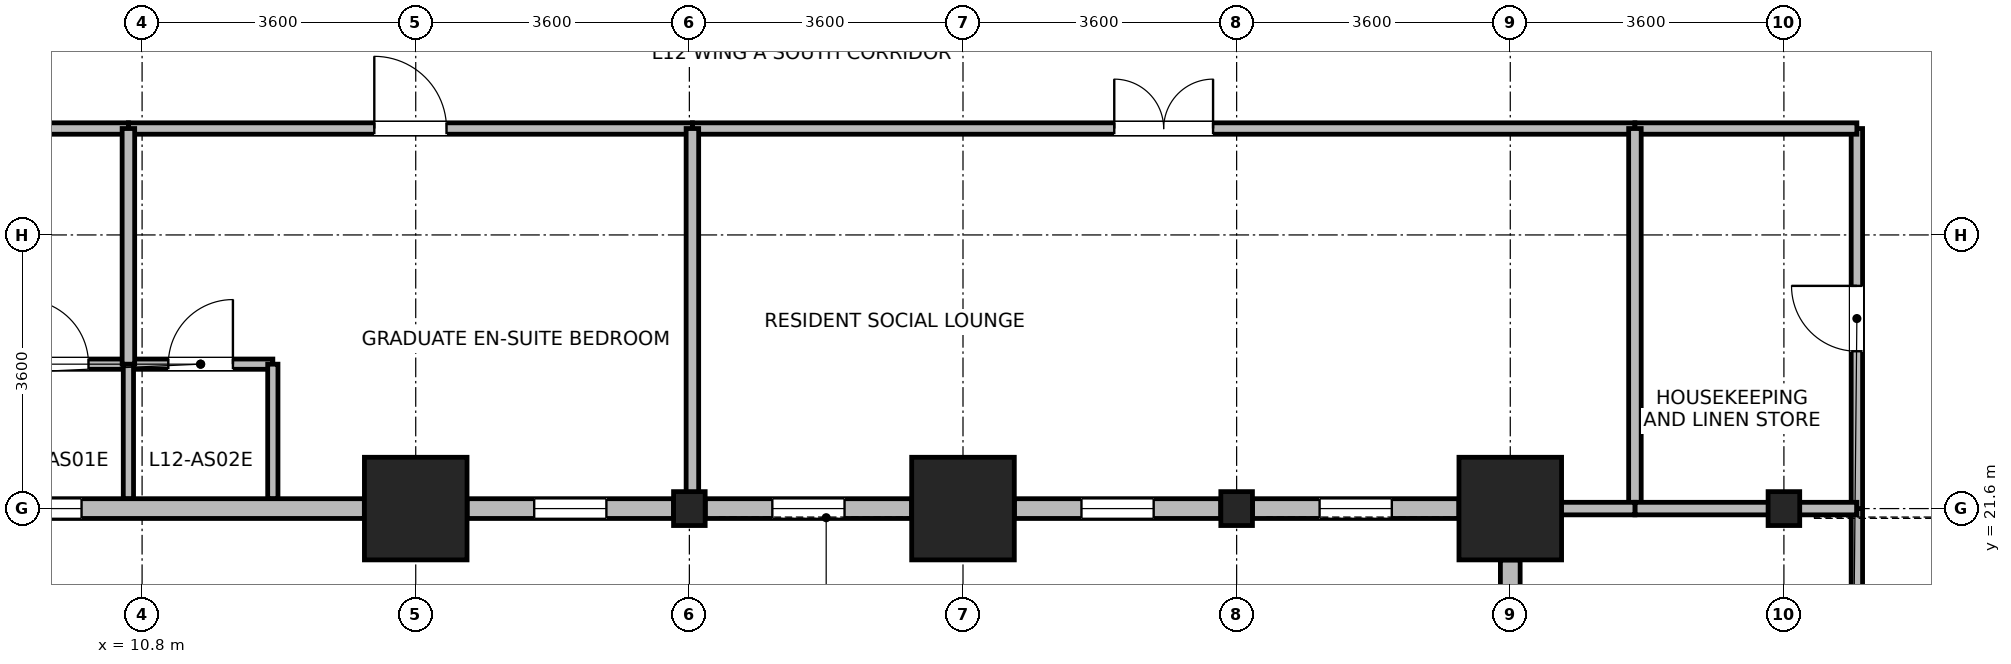
"""IFC4 building model, lengths in metres.
Left out: names, types, materials, properties, quantities, classifications, styles, units other than length and angle.
Written with IfcOpenShell. Run it as: python <this file> out.ifc"""

import sys

from ifc_helpers import new_model, si_unit, direction, frame, frame_2d, origin, origin_2d, place, context, subcontext, project, spatial, rectangle, i_section, extrude, source, transform, mapped, element, fill, save


model = new_model("IFC4")
c1 = context("Model", 3, precision=1e-05, world=origin(), true_north=direction((0.0, 1.0)))
c2 = subcontext(c1, "Body", "Model", "MODEL_VIEW")
j1 = project(units=[si_unit("LENGTHUNIT", "METRE"), si_unit("PLANEANGLEUNIT", "RADIAN")], contexts=[c1])
p1 = place(None, origin())
s1 = spatial("IfcSite", under=j1, at=p1, CompositionType="ELEMENT")
p2 = place(p1, origin())
s2 = spatial("IfcBuilding", under=s1, at=p2, CompositionType="ELEMENT")
p3 = place(p2, frame((0.0, 0.0, 51.2)))
s3 = spatial("IfcBuildingStorey", under=s2, at=p3, CompositionType="ELEMENT", Elevation=51.2)
m1 = source(origin(), c2, "Body", "SweptSolid", [
    extrude(rectangle(XDim=1.35, YDim=1.35, at=origin_2d()), origin(), (0.0, 0.0, 1.0), 3.7),
])
for number, where, z_axis, x_axis in (
    (1, (14.4, 21.6, 0.0), (0.0, 0.0, 1.0), (1.0, 0.0, 0.0)),
    (2, (21.6, 21.6, 0.0), (0.0, 0.0, 1.0), (1.0, 0.0, 0.0)),
    (3, (28.8, 21.6, 0.0), (0.0, 0.0, 1.0), (1.0, 0.0, 0.0)),
):
    element("IfcColumn", number, at=place(p3, frame(where, z_axis=z_axis, x_axis=x_axis)), inside=s3, PredefinedType="COLUMN", context=c2, shape_type="MappedRepresentation", body=[
        mapped(m1, transform((0.0, 0.0, 0.0), x_axis=(1.0, 0.0, 0.0), y_axis=(0.0, 1.0, 0.0), z_axis=(0.0, 0.0, 1.0), scale=1.0)),
    ])
m2 = source(origin(), c2, "Body", "SweptSolid", [
    extrude(i_section(OverallWidth=0.416, OverallDepth=0.446, WebThickness=0.029, FlangeThickness=0.04, FilletRadius=0.015, at=origin_2d()), origin(), (0.0, 0.0, 1.0), 3.7),
])
for number, where, z_axis, x_axis in (
    (4, (18.0, 21.6, 0.0), (0.0, 0.0, 1.0), (1.0, 0.0, 0.0)),
    (5, (25.2, 21.6, 0.0), (0.0, 0.0, 1.0), (1.0, 0.0, 0.0)),
    (6, (32.4, 21.6, 0.0), (0.0, 0.0, 1.0), (1.0, 0.0, 0.0)),
):
    element("IfcColumn", number, at=place(p3, frame(where, z_axis=z_axis, x_axis=x_axis)), inside=s3, PredefinedType="COLUMN", context=c2, shape_type="MappedRepresentation", body=[
        mapped(m2, transform((0.0, 0.0, 0.0), x_axis=(1.0, 0.0, 0.0), y_axis=(0.0, 1.0, 0.0), z_axis=(0.0, 0.0, 1.0), scale=1.0)),
    ])
p4 = place(p3, frame((13.724, 21.6, 0.0), z_axis=(0.0, 0.0, 1.0), x_axis=(-1.0, 0.0, 0.0)))
e7 = element("IfcWall", 7, at=p4, inside=s3, PredefinedType="STANDARD", context=c2, shape_type="SweptSolid", body=[
    extrude(rectangle(XDim=9.989, YDim=0.26, at=frame_2d((4.995, 0.0))), origin(), (0.0, 0.0, 1.0), 3.43),
])
p5 = place(p4, frame((7.574, 0.0, 0.85)))
e8 = element("IfcOpeningElement", 8, at=p5, cuts=e7, PredefinedType="OPENING", context=c2, shape_type="SweptSolid", body=[
    extrude(rectangle(XDim=1.5, YDim=1.85, at=frame_2d((0.75, 0.925))), frame((0.0, 0.14, 0.0), z_axis=(0.0, -1.0, 0.0), x_axis=(1.0, 0.0, 0.0)), (0.0, 0.0, 1.0), 0.28),
])
p6 = place(p4, frame((3.72, 0.0, 0.85)))
e9 = element("IfcOpeningElement", 9, at=p6, cuts=e7, PredefinedType="OPENING", context=c2, shape_type="SweptSolid", body=[
    extrude(rectangle(XDim=0.95, YDim=1.75, at=frame_2d((0.475, 0.875))), frame((0.0, 0.14, 0.0), z_axis=(0.0, -1.0, 0.0), x_axis=(1.0, 0.0, 0.0)), (0.0, 0.0, 1.0), 0.28),
])
p7 = place(p3, frame((17.791, 21.6, 0.0), z_axis=(0.0, 0.0, 1.0), x_axis=(-1.0, 0.0, 0.0)))
e10 = element("IfcWall", 10, at=p7, inside=s3, PredefinedType="STANDARD", context=c2, shape_type="SweptSolid", body=[
    extrude(rectangle(XDim=2.715, YDim=0.26, at=frame_2d((1.357, 0.0))), origin(), (0.0, 0.0, 1.0), 2.93),
])
p8 = place(p7, frame((0.883, 0.0, 0.85)))
e11 = element("IfcOpeningElement", 11, at=p8, cuts=e10, PredefinedType="OPENING", context=c2, shape_type="SweptSolid", body=[
    extrude(rectangle(XDim=0.95, YDim=1.75, at=frame_2d((0.475, 0.875))), frame((0.0, 0.14, 0.0), z_axis=(0.0, -1.0, 0.0), x_axis=(1.0, 0.0, 0.0)), (0.0, 0.0, 1.0), 0.28),
])
p9 = place(p3, frame((20.924, 21.6, 0.0), z_axis=(0.0, 0.0, 1.0), x_axis=(-1.0, 0.0, 0.0)))
e12 = element("IfcWall", 12, at=p9, inside=s3, PredefinedType="STANDARD", context=c2, shape_type="SweptSolid", body=[
    extrude(rectangle(XDim=2.715, YDim=0.26, at=frame_2d((1.357, 0.0))), origin(), (0.0, 0.0, 1.0), 2.93),
])
p10 = place(p9, frame((0.883, 0.0, 0.85)))
e13 = element("IfcOpeningElement", 13, at=p10, cuts=e12, PredefinedType="OPENING", context=c2, shape_type="SweptSolid", body=[
    extrude(rectangle(XDim=0.95, YDim=1.75, at=frame_2d((0.475, 0.875))), frame((0.0, 0.14, 0.0), z_axis=(0.0, -1.0, 0.0), x_axis=(1.0, 0.0, 0.0)), (0.0, 0.0, 1.0), 0.28),
])
p11 = place(p3, frame((24.991, 21.6, 0.0), z_axis=(0.0, 0.0, 1.0), x_axis=(-1.0, 0.0, 0.0)))
e14 = element("IfcWall", 14, at=p11, inside=s3, PredefinedType="STANDARD", context=c2, shape_type="SweptSolid", body=[
    extrude(rectangle(XDim=2.715, YDim=0.26, at=frame_2d((1.357, 0.0))), origin(), (0.0, 0.0, 1.0), 2.93),
])
p12 = place(p11, frame((0.883, 0.0, 0.85)))
e15 = element("IfcOpeningElement", 15, at=p12, cuts=e14, PredefinedType="OPENING", context=c2, shape_type="SweptSolid", body=[
    extrude(rectangle(XDim=0.95, YDim=1.75, at=frame_2d((0.475, 0.875))), frame((0.0, 0.14, 0.0), z_axis=(0.0, -1.0, 0.0), x_axis=(1.0, 0.0, 0.0)), (0.0, 0.0, 1.0), 0.28),
])
p13 = place(p3, frame((28.124, 21.6, 0.0), z_axis=(0.0, 0.0, 1.0), x_axis=(-1.0, 0.0, 0.0)))
e16 = element("IfcWall", 16, at=p13, inside=s3, PredefinedType="STANDARD", context=c2, shape_type="SweptSolid", body=[
    extrude(rectangle(XDim=2.715, YDim=0.26, at=frame_2d((1.357, 0.0))), origin(), (0.0, 0.0, 1.0), 2.93),
])
p14 = place(p13, frame((0.883, 0.0, 0.85)))
e17 = element("IfcOpeningElement", 17, at=p14, cuts=e16, PredefinedType="OPENING", context=c2, shape_type="SweptSolid", body=[
    extrude(rectangle(XDim=0.95, YDim=1.75, at=frame_2d((0.475, 0.875))), frame((0.0, 0.14, 0.0), z_axis=(0.0, -1.0, 0.0), x_axis=(1.0, 0.0, 0.0)), (0.0, 0.0, 1.0), 0.28),
])
p15 = place(p3, frame((28.8, 1.67, 0.0), z_axis=(0.0, 0.0, 1.0), x_axis=(0.0, 1.0, 0.0)))
e18 = element("IfcWall", 18, at=p15, inside=s3, PredefinedType="STANDARD", context=c2, shape_type="SweptSolid", body=[
    extrude(rectangle(XDim=19.254, YDim=0.26, at=frame_2d((9.627, 0.0))), origin(), (0.0, 0.0, 1.0), 3.43),
])
p16 = place(p15, frame((0.854, 0.0, 0.85)))
e19 = element("IfcOpeningElement", 19, at=p16, cuts=e18, PredefinedType="OPENING", context=c2, shape_type="SweptSolid", body=[
    extrude(rectangle(XDim=1.5, YDim=1.85, at=frame_2d((0.75, 0.925))), frame((0.0, 0.14, 0.0), z_axis=(0.0, -1.0, 0.0), x_axis=(1.0, 0.0, 0.0)), (0.0, 0.0, 1.0), 0.28),
])
p17 = place(p15, frame((7.272, 0.0, 0.85)))
e20 = element("IfcOpeningElement", 20, at=p17, cuts=e18, PredefinedType="OPENING", context=c2, shape_type="SweptSolid", body=[
    extrude(rectangle(XDim=1.5, YDim=1.85, at=frame_2d((0.75, 0.925))), frame((0.0, 0.14, 0.0), z_axis=(0.0, -1.0, 0.0), x_axis=(1.0, 0.0, 0.0)), (0.0, 0.0, 1.0), 0.28),
])
p18 = place(p15, frame((10.481, 0.0, 0.85)))
e21 = element("IfcOpeningElement", 21, at=p18, cuts=e18, PredefinedType="OPENING", context=c2, shape_type="SweptSolid", body=[
    extrude(rectangle(XDim=1.5, YDim=1.85, at=frame_2d((0.75, 0.925))), frame((0.0, 0.14, 0.0), z_axis=(0.0, -1.0, 0.0), x_axis=(1.0, 0.0, 0.0)), (0.0, 0.0, 1.0), 0.28),
])
p19 = place(p15, frame((13.69, 0.0, 0.85)))
e22 = element("IfcOpeningElement", 22, at=p19, cuts=e18, PredefinedType="OPENING", context=c2, shape_type="SweptSolid", body=[
    extrude(rectangle(XDim=1.5, YDim=1.85, at=frame_2d((0.75, 0.925))), frame((0.0, 0.14, 0.0), z_axis=(0.0, -1.0, 0.0), x_axis=(1.0, 0.0, 0.0)), (0.0, 0.0, 1.0), 0.28),
])
p20 = place(p15, frame((16.899, 0.0, 0.85)))
e23 = element("IfcOpeningElement", 23, at=p20, cuts=e18, PredefinedType="OPENING", context=c2, shape_type="SweptSolid", body=[
    extrude(rectangle(XDim=1.5, YDim=1.85, at=frame_2d((0.75, 0.925))), frame((0.0, 0.14, 0.0), z_axis=(0.0, -1.0, 0.0), x_axis=(1.0, 0.0, 0.0)), (0.0, 0.0, 1.0), 0.28),
])
p21 = place(p3, frame((10.62, 23.5, 0.0), z_axis=(0.0, 0.0, 1.0), x_axis=(1.0, 0.0, 0.0)))
e24 = element("IfcWall", 24, at=p21, inside=s3, PredefinedType="PARTITIONING", context=c2, shape_type="SweptSolid", body=[
    extrude(rectangle(XDim=1.9, YDim=0.135, at=frame_2d((0.95, 0.0))), origin(), (0.0, 0.0, 1.0), 3.43),
])
p22 = place(p21, frame((0.525, 0.0, 0.0)))
e25 = element("IfcOpeningElement", 25, at=p22, cuts=e24, PredefinedType="OPENING", context=c2, shape_type="SweptSolid", body=[
    extrude(rectangle(XDim=0.85, YDim=2.04, at=frame_2d((0.425, 1.02))), frame((0.0, 0.078, 0.0), z_axis=(0.0, -1.0, 0.0), x_axis=(1.0, 0.0, 0.0)), (0.0, 0.0, 1.0), 0.155),
])
p23 = place(p3, frame((8.72, 23.5, 0.0), z_axis=(0.0, 0.0, 1.0), x_axis=(1.0, 0.0, 0.0)))
e26 = element("IfcWall", 26, at=p23, inside=s3, PredefinedType="PARTITIONING", context=c2, shape_type="SweptSolid", body=[
    extrude(rectangle(XDim=1.9, YDim=0.135, at=frame_2d((0.95, 0.0))), origin(), (0.0, 0.0, 1.0), 3.43),
])
p24 = place(p23, frame((0.525, 0.0, 0.0)))
e27 = element("IfcOpeningElement", 27, at=p24, cuts=e26, PredefinedType="OPENING", context=c2, shape_type="SweptSolid", body=[
    extrude(rectangle(XDim=0.85, YDim=2.04, at=frame_2d((0.425, 1.02))), frame((0.0, 0.078, 0.0), z_axis=(0.0, -1.0, 0.0), x_axis=(1.0, 0.0, 0.0)), (0.0, 0.0, 1.0), 0.155),
])
for number, where, z_axis, x_axis in (
    (28, (10.62, 21.732, 0.0), (0.0, 0.0, 1.0), (0.0, 1.0, 0.0)),
    (29, (12.52, 21.732, 0.0), (0.0, 0.0, 1.0), (0.0, 1.0, 0.0)),
):
    element("IfcWall", number, at=place(p3, frame(where, z_axis=z_axis, x_axis=x_axis)), inside=s3, PredefinedType="PARTITIONING", context=c2, shape_type="SweptSolid", body=[
        extrude(rectangle(XDim=1.768, YDim=0.135, at=frame_2d((0.884, 0.0))), origin(), (0.0, 0.0, 1.0), 3.43),
    ])
p25 = place(p3, frame((18.04, 26.6, 0.0), z_axis=(0.0, 0.0, 1.0), x_axis=(1.0, 0.0, 0.0)))
e30 = element("IfcWall", 30, at=p25, inside=s3, PredefinedType="PARTITIONING", context=c2, shape_type="SweptSolid", body=[
    extrude(rectangle(XDim=12.4, YDim=0.15, at=frame_2d((6.2, 0.0))), origin(), (0.0, 0.0, 1.0), 3.43),
])
p26 = place(p25, frame((5.55, 0.0, 0.0)))
e31 = element("IfcOpeningElement", 31, at=p26, cuts=e30, PredefinedType="OPENING", context=c2, shape_type="SweptSolid", body=[
    extrude(rectangle(XDim=1.3, YDim=2.12, at=frame_2d((0.65, 1.06))), frame((0.0, 0.085, 0.0), z_axis=(0.0, -1.0, 0.0), x_axis=(1.0, 0.0, 0.0)), (0.0, 0.0, 1.0), 0.17),
])
p27 = place(p3, frame((10.62, 26.6, 0.0), z_axis=(0.0, 0.0, 1.0), x_axis=(1.0, 0.0, 0.0)))
e32 = element("IfcWall", 32, at=p27, inside=s3, PredefinedType="PARTITIONING", context=c2, shape_type="SweptSolid", body=[
    extrude(rectangle(XDim=7.42, YDim=0.15, at=frame_2d((3.71, 0.0))), origin(), (0.0, 0.0, 1.0), 3.43),
])
p28 = place(p27, frame((3.235, 0.0, 0.0)))
e33 = element("IfcOpeningElement", 33, at=p28, cuts=e32, PredefinedType="OPENING", context=c2, shape_type="SweptSolid", body=[
    extrude(rectangle(XDim=0.95, YDim=2.1, at=frame_2d((0.475, 1.05))), frame((0.0, 0.085, 0.0), z_axis=(0.0, -1.0, 0.0), x_axis=(1.0, 0.0, 0.0)), (0.0, 0.0, 1.0), 0.17),
])
p29 = place(p3, frame((33.36, 14.5, 0.0), z_axis=(0.0, 0.0, 1.0), x_axis=(0.0, 1.0, 0.0)))
e34 = element("IfcWall", 34, at=p29, inside=s3, PredefinedType="PARTITIONING", context=c2, shape_type="SweptSolid", body=[
    extrude(rectangle(XDim=7.1, YDim=0.15, at=frame_2d((3.55, 0.0))), origin(), (0.0, 0.0, 1.0), 3.43),
])
p30 = place(p29, frame((2.9, 0.0, 0.0)))
e35 = element("IfcOpeningElement", 35, at=p30, cuts=e34, PredefinedType="OPENING", context=c2, shape_type="SweptSolid", body=[
    extrude(rectangle(XDim=1.3, YDim=2.12, at=frame_2d((0.65, 1.06))), frame((0.0, 0.085, 0.0), z_axis=(0.0, -1.0, 0.0), x_axis=(1.0, 0.0, 0.0)), (0.0, 0.0, 1.0), 0.17),
])
p31 = place(p3, frame((3.732, 26.6, 0.0), z_axis=(0.0, 0.0, 1.0), x_axis=(1.0, 0.0, 0.0)))
e36 = element("IfcWall", 36, at=p31, inside=s3, PredefinedType="PARTITIONING", context=c2, shape_type="SweptSolid", body=[
    extrude(rectangle(XDim=6.888, YDim=0.15, at=frame_2d((3.444, 0.0))), origin(), (0.0, 0.0, 1.0), 3.43),
])
p32 = place(p31, frame((2.969, 0.0, 0.0)))
e37 = element("IfcOpeningElement", 37, at=p32, cuts=e36, PredefinedType="OPENING", context=c2, shape_type="SweptSolid", body=[
    extrude(rectangle(XDim=0.95, YDim=2.1, at=frame_2d((0.475, 1.05))), frame((0.0, 0.085, 0.0), z_axis=(0.0, -1.0, 0.0), x_axis=(1.0, 0.0, 0.0)), (0.0, 0.0, 1.0), 0.17),
])
p33 = place(p3, frame((33.36, 21.6, 0.0), z_axis=(0.0, 0.0, 1.0), x_axis=(0.0, 1.0, 0.0)))
e38 = element("IfcWall", 38, at=p33, inside=s3, PredefinedType="PARTITIONING", context=c2, shape_type="SweptSolid", body=[
    extrude(rectangle(XDim=5.0, YDim=0.15, at=frame_2d((2.5, 0.0))), origin(), (0.0, 0.0, 1.0), 3.43),
])
p34 = place(p33, frame((2.07, 0.0, 0.0)))
e39 = element("IfcOpeningElement", 39, at=p34, cuts=e38, PredefinedType="OPENING", context=c2, shape_type="SweptSolid", body=[
    extrude(rectangle(XDim=0.86, YDim=2.02, at=frame_2d((0.43, 1.01))), frame((0.0, 0.085, 0.0), z_axis=(0.0, -1.0, 0.0), x_axis=(1.0, 0.0, 0.0)), (0.0, 0.0, 1.0), 0.17),
])
p35 = place(p3, frame((30.44, 26.6, 0.0), z_axis=(0.0, 0.0, 1.0), x_axis=(1.0, 0.0, 0.0)))
e40 = element("IfcWall", 40, at=p35, inside=s3, PredefinedType="PARTITIONING", context=c2, shape_type="SweptSolid", body=[
    extrude(rectangle(XDim=2.92, YDim=0.15, at=frame_2d((1.46, 0.0))), origin(), (0.0, 0.0, 1.0), 3.43),
])
p36 = place(p3, frame((18.04, 21.732, 0.0), z_axis=(0.0, 0.0, 1.0), x_axis=(0.0, 1.0, 0.0)))
e41 = element("IfcWall", 41, at=p36, inside=s3, PredefinedType="PARTITIONING", context=c2, shape_type="SweptSolid", body=[
    extrude(rectangle(XDim=4.868, YDim=0.165, at=frame_2d((2.434, 0.0))), origin(), (0.0, 0.0, 1.0), 3.07),
])
p37 = place(p3, frame((30.44, 21.6, 0.0), z_axis=(0.0, 0.0, 1.0), x_axis=(0.0, 1.0, 0.0)))
e42 = element("IfcWall", 42, at=p37, inside=s3, PredefinedType="PARTITIONING", context=c2, shape_type="SweptSolid", body=[
    extrude(rectangle(XDim=5.0, YDim=0.165, at=frame_2d((2.5, 0.0))), origin(), (0.0, 0.0, 1.0), 3.43),
])
p38 = place(p3, frame((10.62, 23.5, 0.0), z_axis=(0.0, 0.0, 1.0), x_axis=(0.0, 1.0, 0.0)))
e43 = element("IfcWall", 43, at=p38, inside=s3, PredefinedType="PARTITIONING", context=c2, shape_type="SweptSolid", body=[
    extrude(rectangle(XDim=3.1, YDim=0.165, at=frame_2d((1.55, 0.0))), origin(), (0.0, 0.0, 1.0), 3.43),
])
p39 = place(p3, frame((30.44, 21.6, 0.0), z_axis=(0.0, 0.0, 1.0), x_axis=(1.0, 0.0, 0.0)))
e44 = element("IfcWall", 44, at=p39, inside=s3, PredefinedType="PARTITIONING", context=c2, shape_type="SweptSolid", body=[
    extrude(rectangle(XDim=2.92, YDim=0.165, at=frame_2d((1.46, 0.0))), origin(), (0.0, 0.0, 1.0), 2.93),
])
p40 = place(p3, frame((28.932, 21.6, 0.0), z_axis=(0.0, 0.0, 1.0), x_axis=(1.0, 0.0, 0.0)))
e45 = element("IfcWall", 45, at=p40, inside=s3, PredefinedType="PARTITIONING", context=c2, shape_type="SweptSolid", body=[
    extrude(rectangle(XDim=1.508, YDim=0.165, at=frame_2d((0.754, 0.0))), origin(), (0.0, 0.0, 1.0), 2.93),
])
p41 = place(p6, origin())
e46 = element("IfcWindow", 46, at=p41, inside=s3, PartitioningType="SINGLE_PANEL", PredefinedType="WINDOW", context=c2, shape_type="SweptSolid", body=[
    extrude(rectangle(XDim=0.95, YDim=1.75, at=frame_2d((0.475, 0.875))), frame((0.0, 0.03, 0.0), z_axis=(0.0, -1.0, 0.0), x_axis=(1.0, 0.0, 0.0)), (0.0, 0.0, 1.0), 0.06),
])
fill(e9, e46)
p42 = place(p8, origin())
e47 = element("IfcWindow", 47, at=p42, inside=s3, PartitioningType="SINGLE_PANEL", PredefinedType="WINDOW", context=c2, shape_type="SweptSolid", body=[
    extrude(rectangle(XDim=0.95, YDim=1.75, at=frame_2d((0.475, 0.875))), frame((0.0, 0.03, 0.0), z_axis=(0.0, -1.0, 0.0), x_axis=(1.0, 0.0, 0.0)), (0.0, 0.0, 1.0), 0.06),
])
fill(e11, e47)
p43 = place(p10, origin())
e48 = element("IfcWindow", 48, at=p43, inside=s3, PartitioningType="SINGLE_PANEL", PredefinedType="WINDOW", context=c2, shape_type="SweptSolid", body=[
    extrude(rectangle(XDim=0.95, YDim=1.75, at=frame_2d((0.475, 0.875))), frame((0.0, 0.03, 0.0), z_axis=(0.0, -1.0, 0.0), x_axis=(1.0, 0.0, 0.0)), (0.0, 0.0, 1.0), 0.06),
])
fill(e13, e48)
p44 = place(p12, origin())
e49 = element("IfcWindow", 49, at=p44, inside=s3, PartitioningType="SINGLE_PANEL", PredefinedType="WINDOW", context=c2, shape_type="SweptSolid", body=[
    extrude(rectangle(XDim=0.95, YDim=1.75, at=frame_2d((0.475, 0.875))), frame((0.0, 0.03, 0.0), z_axis=(0.0, -1.0, 0.0), x_axis=(1.0, 0.0, 0.0)), (0.0, 0.0, 1.0), 0.06),
])
fill(e15, e49)
p45 = place(p14, origin())
e50 = element("IfcWindow", 50, at=p45, inside=s3, PartitioningType="SINGLE_PANEL", PredefinedType="WINDOW", context=c2, shape_type="SweptSolid", body=[
    extrude(rectangle(XDim=0.95, YDim=1.75, at=frame_2d((0.475, 0.875))), frame((0.0, 0.03, 0.0), z_axis=(0.0, -1.0, 0.0), x_axis=(1.0, 0.0, 0.0)), (0.0, 0.0, 1.0), 0.06),
])
fill(e17, e50)
p46 = place(p22, origin())
e51 = element("IfcDoor", 51, at=p46, inside=s3, OperationType="SINGLE_SWING_RIGHT", PredefinedType="DOOR", context=c2, shape_type="SweptSolid", body=[
    extrude(rectangle(XDim=0.85, YDim=2.04, at=frame_2d((0.425, 1.02))), frame((0.0, 0.025, 0.0), z_axis=(0.0, -1.0, 0.0), x_axis=(1.0, 0.0, 0.0)), (0.0, 0.0, 1.0), 0.05),
])
fill(e25, e51)
p47 = place(p24, origin())
e52 = element("IfcDoor", 52, at=p47, inside=s3, OperationType="SINGLE_SWING_LEFT", PredefinedType="DOOR", context=c2, shape_type="SweptSolid", body=[
    extrude(rectangle(XDim=0.85, YDim=2.04, at=frame_2d((0.425, 1.02))), frame((0.0, 0.025, 0.0), z_axis=(0.0, -1.0, 0.0), x_axis=(1.0, 0.0, 0.0)), (0.0, 0.0, 1.0), 0.05),
])
fill(e27, e52)
p48 = place(p26, origin())
e53 = element("IfcDoor", 53, at=p48, inside=s3, OperationType="DOUBLE_DOOR_SINGLE_SWING", PredefinedType="DOOR", context=c2, shape_type="SweptSolid", body=[
    extrude(rectangle(XDim=1.3, YDim=2.12, at=frame_2d((0.65, 1.06))), frame((0.0, 0.025, 0.0), z_axis=(0.0, -1.0, 0.0), x_axis=(1.0, 0.0, 0.0)), (0.0, 0.0, 1.0), 0.05),
])
fill(e31, e53)
p49 = place(p28, origin())
e54 = element("IfcDoor", 54, at=p49, inside=s3, OperationType="SINGLE_SWING_LEFT", PredefinedType="DOOR", context=c2, shape_type="SweptSolid", body=[
    extrude(rectangle(XDim=0.95, YDim=2.1, at=frame_2d((0.475, 1.05))), frame((0.0, 0.025, 0.0), z_axis=(0.0, -1.0, 0.0), x_axis=(1.0, 0.0, 0.0)), (0.0, 0.0, 1.0), 0.05),
])
fill(e33, e54)
p50 = place(p34, origin())
e55 = element("IfcDoor", 55, at=p50, inside=s3, OperationType="SINGLE_SWING_RIGHT", PredefinedType="DOOR", context=c2, shape_type="SweptSolid", body=[
    extrude(rectangle(XDim=0.86, YDim=2.02, at=frame_2d((0.43, 1.01))), frame((0.0, 0.025, 0.0), z_axis=(0.0, -1.0, 0.0), x_axis=(1.0, 0.0, 0.0)), (0.0, 0.0, 1.0), 0.05),
])
fill(e39, e55)
save(model, sys.argv[1])
